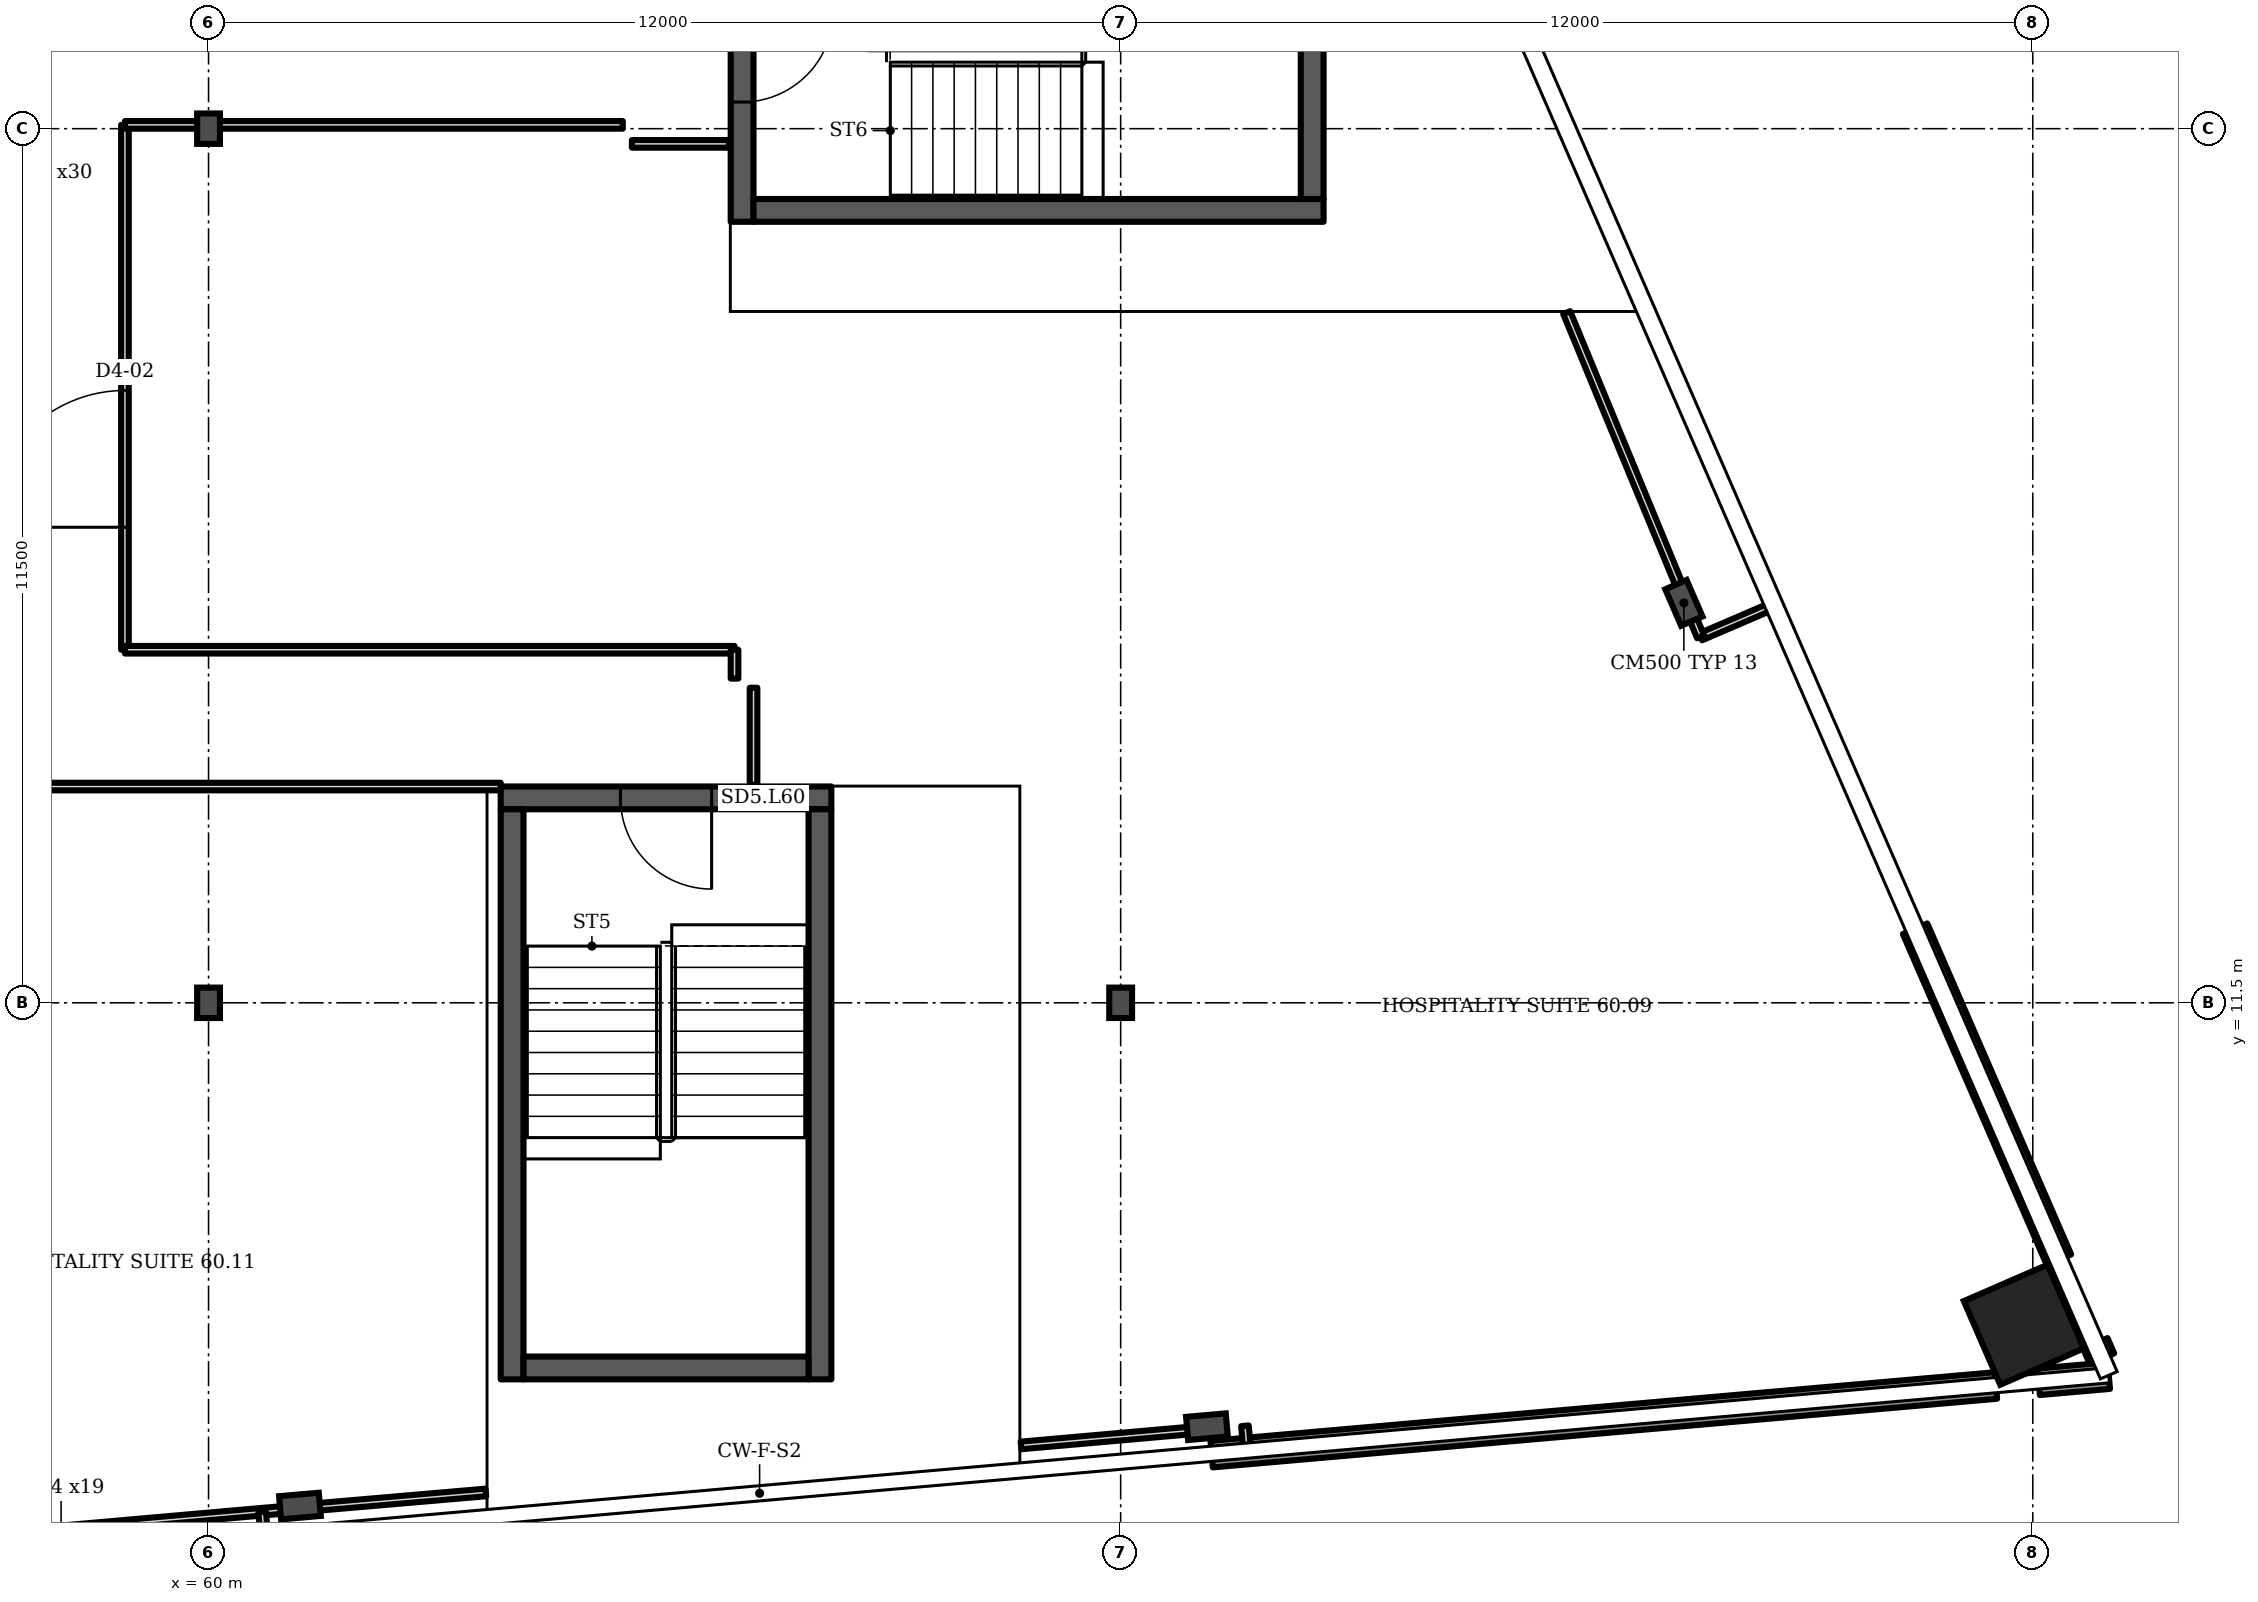
"""IFC4 building model, lengths in metres.
Left out: names, types, materials, properties, quantities, classifications, styles, units other than length and angle.
Written with IfcOpenShell. Run it as: python <this file> out.ifc"""

import sys

from ifc_helpers import new_model, si_unit, direction, frame, frame_2d, origin, origin_2d, place, context, subcontext, project, spatial, rectangle, i_section, extrude, element, fill, save


model = new_model("IFC4")
c1 = context("Model", 3, precision=1e-05, world=origin(), true_north=direction((0.0, 1.0)))
c2 = subcontext(c1, "Body", "Model", "MODEL_VIEW")
j1 = project(units=[si_unit("LENGTHUNIT", "METRE"), si_unit("PLANEANGLEUNIT", "RADIAN")], contexts=[c1])
p1 = place(None, origin())
s1 = spatial("IfcSite", under=j1, at=p1, CompositionType="ELEMENT")
p2 = place(p1, origin())
s2 = spatial("IfcBuilding", under=s1, at=p2, CompositionType="ELEMENT")
p3 = place(p2, frame((0.0, 0.0, 239.5)))
s3 = spatial("IfcBuildingStorey", under=s2, at=p3, CompositionType="ELEMENT", Elevation=239.5)
p4 = place(p3, frame((83.883, 7.265, 0.0), z_axis=(0.0, 0.0, 1.0), x_axis=(-0.398727, 0.917072, 0.0)))
e1 = element("IfcColumn", 1, at=p4, inside=s3, PredefinedType="COLUMN", context=c2, shape_type="SweptSolid", body=[
    extrude(rectangle(XDim=1.2, YDim=1.2, at=origin_2d()), origin(), (0.0, 0.0, 1.0), 3.6),
])
for number, where, z_axis, x_axis in (
    (2, (61.202, 4.879, 0.0), (0.0, 0.0, 1.0), (0.087, -0.996, 0.0)),
    (3, (73.135, 5.923, 0.0), (0.0, 0.0, 1.0), (0.087, -0.996, 0.0)),
    (4, (79.41, 16.762, 0.0), (0.0, 0.0, 1.0), (0.917, 0.399, 0.0)),
):
    element("IfcColumn", number, at=place(p3, frame(where, z_axis=z_axis, x_axis=x_axis)), inside=s3, PredefinedType="COLUMN", context=c2, shape_type="SweptSolid", body=[
        extrude(i_section(OverallWidth=0.306, OverallDepth=0.524, WebThickness=0.021, FlangeThickness=0.04, FilletRadius=0.027, at=origin_2d()), origin(), (0.0, 0.0, 1.0), 3.6),
    ])
for number, where, z_axis, x_axis in (
    (5, (60.0, 11.5, 0.0), (0.0, 0.0, 1.0), (1.0, 0.0, 0.0)),
    (6, (72.0, 11.5, 0.0), (0.0, 0.0, 1.0), (1.0, 0.0, 0.0)),
    (7, (60.0, 23.0, 0.0), (0.0, 0.0, 1.0), (1.0, 0.0, 0.0)),
):
    element("IfcColumn", number, at=place(p3, frame(where, z_axis=z_axis, x_axis=x_axis)), inside=s3, PredefinedType="COLUMN", context=c2, shape_type="SweptSolid", body=[
        extrude(i_section(OverallWidth=0.3, OverallDepth=0.4, WebThickness=0.013, FlangeThickness=0.024, FilletRadius=0.027, at=origin_2d()), origin(), (0.0, 0.0, 1.0), 3.6),
    ])
p5 = place(p3, frame((73.197, 5.562, 0.0), z_axis=(0.0, 0.0, 1.0), x_axis=(0.996198, 0.087163, 0.0)))
e8 = element("IfcWall", 8, at=p5, inside=s3, PredefinedType="SOLIDWALL", context=c2, shape_type="SweptSolid", body=[
    extrude(rectangle(XDim=10.358, YDim=0.35, at=frame_2d((5.179, 0.0))), origin(), (0.0, 0.0, 1.0), 1.0),
])
p6 = place(p3, frame((84.078, 6.514, 0.0), z_axis=(0.0, 0.0, 1.0), x_axis=(0.996213, 0.086971, 0.0)))
e9 = element("IfcWall", 9, at=p6, inside=s3, PredefinedType="SOLIDWALL", context=c2, shape_type="SweptSolid", body=[
    extrude(rectangle(XDim=0.926, YDim=0.35, at=frame_2d((0.463, 0.0))), origin(), (0.0, 0.0, 1.0), 1.0),
])
p7 = place(p3, frame((84.91, 6.819, 0.0), z_axis=(0.0, 0.0, 1.0), x_axis=(-0.398359, 0.91723, 0.0)))
e10 = element("IfcWall", 10, at=p7, inside=s3, PredefinedType="SOLIDWALL", context=c2, shape_type="SweptSolid", body=[
    extrude(rectangle(XDim=0.219, YDim=0.35, at=frame_2d((0.109, 0.0))), origin(), (0.0, 0.0, 1.0), 1.0),
])
p8 = place(p3, frame((84.345, 8.12, 0.0), z_axis=(0.0, 0.0, 1.0), x_axis=(-0.398736, 0.917067, 0.0)))
e11 = element("IfcWall", 11, at=p8, inside=s3, PredefinedType="SOLIDWALL", context=c2, shape_type="SweptSolid", body=[
    extrude(rectangle(XDim=4.748, YDim=0.35, at=frame_2d((2.374, 0.0))), origin(), (0.0, 0.0, 1.0), 1.0),
])
p9 = place(p3, frame((63.844, 14.196, 0.0), z_axis=(0.0, 0.0, 1.0), x_axis=(1.0, 0.0, 0.0)))
e12 = element("IfcWall", 12, at=p9, inside=s3, PredefinedType="SHEAR", context=c2, shape_type="SweptSolid", body=[
    extrude(rectangle(XDim=4.35, YDim=0.3, at=frame_2d((2.175, 0.0))), origin(), (0.0, 0.0, 1.0), 3.2),
])
p10 = place(p9, frame((1.575, 0.0, 0.0)))
e13 = element("IfcOpeningElement", 13, at=p10, cuts=e12, PredefinedType="OPENING", context=c2, shape_type="SweptSolid", body=[
    extrude(rectangle(XDim=1.2, YDim=2.1, at=frame_2d((0.6, 1.05))), frame((0.0, 0.16, 0.0), z_axis=(0.0, -1.0, 0.0), x_axis=(1.0, 0.0, 0.0)), (0.0, 0.0, 1.0), 0.32),
])
p11 = place(p3, frame((67.02, 21.775, 0.0), z_axis=(0.0, 0.0, 1.0), x_axis=(0.0, 1.0, 0.0)))
e14 = element("IfcWall", 14, at=p11, inside=s3, PredefinedType="SHEAR", context=c2, shape_type="SweptSolid", body=[
    extrude(rectangle(XDim=4.35, YDim=0.3, at=frame_2d((2.175, 0.0))), origin(), (0.0, 0.0, 1.0), 3.2),
])
p12 = place(p11, frame((1.575, 0.0, 0.0)))
e15 = element("IfcOpeningElement", 15, at=p12, cuts=e14, PredefinedType="OPENING", context=c2, shape_type="SweptSolid", body=[
    extrude(rectangle(XDim=1.2, YDim=2.1, at=frame_2d((0.6, 1.05))), frame((0.0, 0.16, 0.0), z_axis=(0.0, -1.0, 0.0), x_axis=(1.0, 0.0, 0.0)), (0.0, 0.0, 1.0), 0.32),
])
p13 = place(p3, frame((55.415, 4.34, 0.0), z_axis=(0.0, 0.0, 1.0), x_axis=(0.996159, 0.087534, 0.0)))
e16 = element("IfcWall", 16, at=p13, inside=s3, PredefinedType="PARTITIONING", context=c2, shape_type="SweptSolid", body=[
    extrude(rectangle(XDim=5.31, YDim=0.1, at=frame_2d((2.655, 0.0))), origin(), (0.0, 0.0, 1.0), 2.58),
])
p14 = place(p3, frame((57.1, 14.345, 0.0), z_axis=(0.0, 0.0, 1.0), x_axis=(1.0, 0.0, 0.0)))
e17 = element("IfcWall", 17, at=p14, inside=s3, PredefinedType="PARTITIONING", context=c2, shape_type="SweptSolid", body=[
    extrude(rectangle(XDim=6.744, YDim=0.1, at=frame_2d((3.372, 0.0))), origin(), (0.0, 0.0, 1.0), 3.2),
])
p15 = place(p3, frame((58.9, 16.145, 0.0), z_axis=(0.0, 0.0, 1.0), x_axis=(0.0, 1.0, 0.0)))
e18 = element("IfcWall", 18, at=p15, inside=s3, PredefinedType="PARTITIONING", context=c2, shape_type="SweptSolid", body=[
    extrude(rectangle(XDim=6.905, YDim=0.1, at=frame_2d((3.453, 0.0))), origin(), (0.0, 0.0, 1.0), 3.2),
])
p16 = place(p15, frame((1.611, 0.0, 0.0)))
e19 = element("IfcOpeningElement", 19, at=p16, cuts=e18, PredefinedType="OPENING", context=c2, shape_type="SweptSolid", body=[
    extrude(rectangle(XDim=1.8, YDim=2.1, at=frame_2d((0.9, 1.05))), frame((0.0, 0.06, 0.0), z_axis=(0.0, -1.0, 0.0), x_axis=(1.0, 0.0, 0.0)), (0.0, 0.0, 1.0), 0.12),
])
p17 = place(p3, frame((58.9, 16.145, 0.0), z_axis=(0.0, 0.0, 1.0), x_axis=(1.0, 0.0, 0.0)))
e20 = element("IfcWall", 20, at=p17, inside=s3, PredefinedType="PARTITIONING", context=c2, shape_type="SweptSolid", body=[
    extrude(rectangle(XDim=8.02, YDim=0.1, at=frame_2d((4.01, 0.0))), origin(), (0.0, 0.0, 1.0), 3.2),
])
p18 = place(p3, frame((58.9, 23.05, 0.0), z_axis=(0.0, 0.0, 1.0), x_axis=(1.0, 0.0, 0.0)))
e21 = element("IfcWall", 21, at=p18, inside=s3, PredefinedType="PARTITIONING", context=c2, shape_type="SweptSolid", body=[
    extrude(rectangle(XDim=6.55, YDim=0.1, at=frame_2d((3.275, 0.0))), origin(), (0.0, 0.0, 1.0), 3.2),
])
p19 = place(p3, frame((60.705, 4.805, 0.0), z_axis=(0.0, 0.0, 1.0), x_axis=(0.996324, 0.085692, 0.0)))
e22 = element("IfcWall", 22, at=p19, inside=s3, PredefinedType="PARTITIONING", context=c2, shape_type="SweptSolid", body=[
    extrude(rectangle(XDim=2.955, YDim=0.1, at=frame_2d((1.477, 0.0))), origin(), (0.0, 0.0, 1.0), 2.58),
])
p20 = place(p3, frame((60.733, 4.497, 0.0), z_axis=(0.0, 0.0, 1.0), x_axis=(-0.090037, 0.995936, 0.0)))
e23 = element("IfcWall", 23, at=p20, inside=s3, PredefinedType="PARTITIONING", context=c2, shape_type="SweptSolid", body=[
    extrude(rectangle(XDim=0.309, YDim=0.1, at=frame_2d((0.155, 0.0))), origin(), (0.0, 0.0, 1.0), 3.2),
])
p21 = place(p3, frame((65.57, 22.8, 0.0), z_axis=(0.0, 0.0, 1.0), x_axis=(1.0, 0.0, 0.0)))
e24 = element("IfcWall", 24, at=p21, inside=s3, PredefinedType="PARTITIONING", context=c2, shape_type="SweptSolid", body=[
    extrude(rectangle(XDim=1.28, YDim=0.1, at=frame_2d((0.64, 0.0))), origin(), (0.0, 0.0, 1.0), 3.2),
])
p22 = place(p3, frame((66.92, 15.765, 0.0), z_axis=(0.0, 0.0, 1.0), x_axis=(0.0, 1.0, 0.0)))
e25 = element("IfcWall", 25, at=p22, inside=s3, PredefinedType="PARTITIONING", context=c2, shape_type="SweptSolid", body=[
    extrude(rectangle(XDim=0.38, YDim=0.1, at=frame_2d((0.19, 0.0))), origin(), (0.0, 0.0, 1.0), 3.2),
])
p23 = place(p3, frame((67.17, 14.366, 0.0), z_axis=(0.0, 0.0, 1.0), x_axis=(0.0, 1.0, 0.0)))
e26 = element("IfcWall", 26, at=p23, inside=s3, PredefinedType="PARTITIONING", context=c2, shape_type="SweptSolid", body=[
    extrude(rectangle(XDim=1.279, YDim=0.1, at=frame_2d((0.639, 0.0))), origin(), (0.0, 0.0, 1.0), 3.2),
])
p24 = place(p3, frame((70.689, 5.677, 0.0), z_axis=(0.0, 0.0, 1.0), x_axis=(0.996136, 0.087799, 0.0)))
e27 = element("IfcWall", 27, at=p24, inside=s3, PredefinedType="PARTITIONING", context=c2, shape_type="SweptSolid", body=[
    extrude(rectangle(XDim=2.486, YDim=0.1, at=frame_2d((1.243, 0.0))), origin(), (0.0, 0.0, 1.0), 2.58),
])
p25 = place(p3, frame((73.663, 5.628, 0.0), z_axis=(0.0, 0.0, 1.0), x_axis=(-0.091893, 0.995772, 0.0)))
e28 = element("IfcWall", 28, at=p25, inside=s3, PredefinedType="PARTITIONING", context=c2, shape_type="SweptSolid", body=[
    extrude(rectangle(XDim=0.308, YDim=0.1, at=frame_2d((0.154, 0.0))), origin(), (0.0, 0.0, 1.0), 3.2),
])
p26 = place(p3, frame((79.63, 16.315, 0.0), z_axis=(0.0, 0.0, 1.0), x_axis=(0.918616, 0.395147, 0.0)))
e29 = element("IfcWall", 29, at=p26, inside=s3, PredefinedType="PARTITIONING", context=c2, shape_type="SweptSolid", body=[
    extrude(rectangle(XDim=1.031, YDim=0.1, at=frame_2d((0.516, 0.0))), origin(), (0.0, 0.0, 1.0), 2.58),
])
p27 = place(p3, frame((79.63, 16.315, 0.0), z_axis=(0.0, 0.0, 1.0), x_axis=(-0.381721, 0.924278, 0.0)))
e30 = element("IfcWall", 30, at=p27, inside=s3, PredefinedType="PARTITIONING", context=c2, shape_type="SweptSolid", body=[
    extrude(rectangle(XDim=4.615, YDim=0.1, at=frame_2d((2.307, 0.0))), origin(), (0.0, 0.0, 1.0), 3.2),
])
for number, where, z_axis, x_axis in (
    (31, (63.994, 6.546, 0.0), (0.0, 0.0, 1.0), (0.0, 1.0, 0.0)),
    (32, (68.044, 6.546, 0.0), (0.0, 0.0, 1.0), (0.0, 1.0, 0.0)),
):
    element("IfcWall", number, at=place(p3, frame(where, z_axis=z_axis, x_axis=x_axis)), inside=s3, PredefinedType="SHEAR", context=c2, shape_type="SweptSolid", body=[
        extrude(rectangle(XDim=7.5, YDim=0.3, at=frame_2d((3.75, 0.0))), origin(), (0.0, 0.0, 1.0), 3.2),
    ])
p28 = place(p3, frame((64.144, 6.696, 0.0), z_axis=(0.0, 0.0, 1.0), x_axis=(1.0, 0.0, 0.0)))
e33 = element("IfcWall", 33, at=p28, inside=s3, PredefinedType="SHEAR", context=c2, shape_type="SweptSolid", body=[
    extrude(rectangle(XDim=3.75, YDim=0.3, at=frame_2d((1.875, 0.0))), origin(), (0.0, 0.0, 1.0), 3.2),
])
p29 = place(p3, frame((67.17, 21.925, 0.0), z_axis=(0.0, 0.0, 1.0), x_axis=(1.0, 0.0, 0.0)))
e34 = element("IfcWall", 34, at=p29, inside=s3, PredefinedType="SHEAR", context=c2, shape_type="SweptSolid", body=[
    extrude(rectangle(XDim=7.5, YDim=0.3, at=frame_2d((3.75, 0.0))), origin(), (0.0, 0.0, 1.0), 3.2),
])
p30 = place(p3, frame((74.52, 22.075, 0.0), z_axis=(0.0, 0.0, 1.0), x_axis=(0.0, 1.0, 0.0)))
e35 = element("IfcWall", 35, at=p30, inside=s3, PredefinedType="SHEAR", context=c2, shape_type="SweptSolid", body=[
    extrude(rectangle(XDim=3.75, YDim=0.3, at=frame_2d((1.875, 0.0))), origin(), (0.0, 0.0, 1.0), 3.2),
])
p31 = place(p10, origin())
e36 = element("IfcDoor", 36, at=p31, inside=s3, OperationType="SINGLE_SWING_RIGHT", PredefinedType="DOOR", context=c2, shape_type="SweptSolid", body=[
    extrude(rectangle(XDim=1.2, YDim=2.1, at=frame_2d((0.6, 1.05))), frame((0.0, 0.025, 0.0), z_axis=(0.0, -1.0, 0.0), x_axis=(1.0, 0.0, 0.0)), (0.0, 0.0, 1.0), 0.05),
])
fill(e13, e36)
p32 = place(p12, origin())
e37 = element("IfcDoor", 37, at=p32, inside=s3, OperationType="SINGLE_SWING_RIGHT", PredefinedType="DOOR", context=c2, shape_type="SweptSolid", body=[
    extrude(rectangle(XDim=1.2, YDim=2.1, at=frame_2d((0.6, 1.05))), frame((0.0, 0.025, 0.0), z_axis=(0.0, -1.0, 0.0), x_axis=(1.0, 0.0, 0.0)), (0.0, 0.0, 1.0), 0.05),
])
fill(e15, e37)
p33 = place(p16, origin())
e38 = element("IfcDoor", 38, at=p33, inside=s3, OperationType="DOUBLE_DOOR_SINGLE_SWING", PredefinedType="DOOR", context=c2, shape_type="SweptSolid", body=[
    extrude(rectangle(XDim=1.8, YDim=2.1, at=frame_2d((0.9, 1.05))), frame((0.0, 0.025, 0.0), z_axis=(0.0, -1.0, 0.0), x_axis=(1.0, 0.0, 0.0)), (0.0, 0.0, 1.0), 0.05),
])
fill(e19, e38)
save(model, sys.argv[1])
